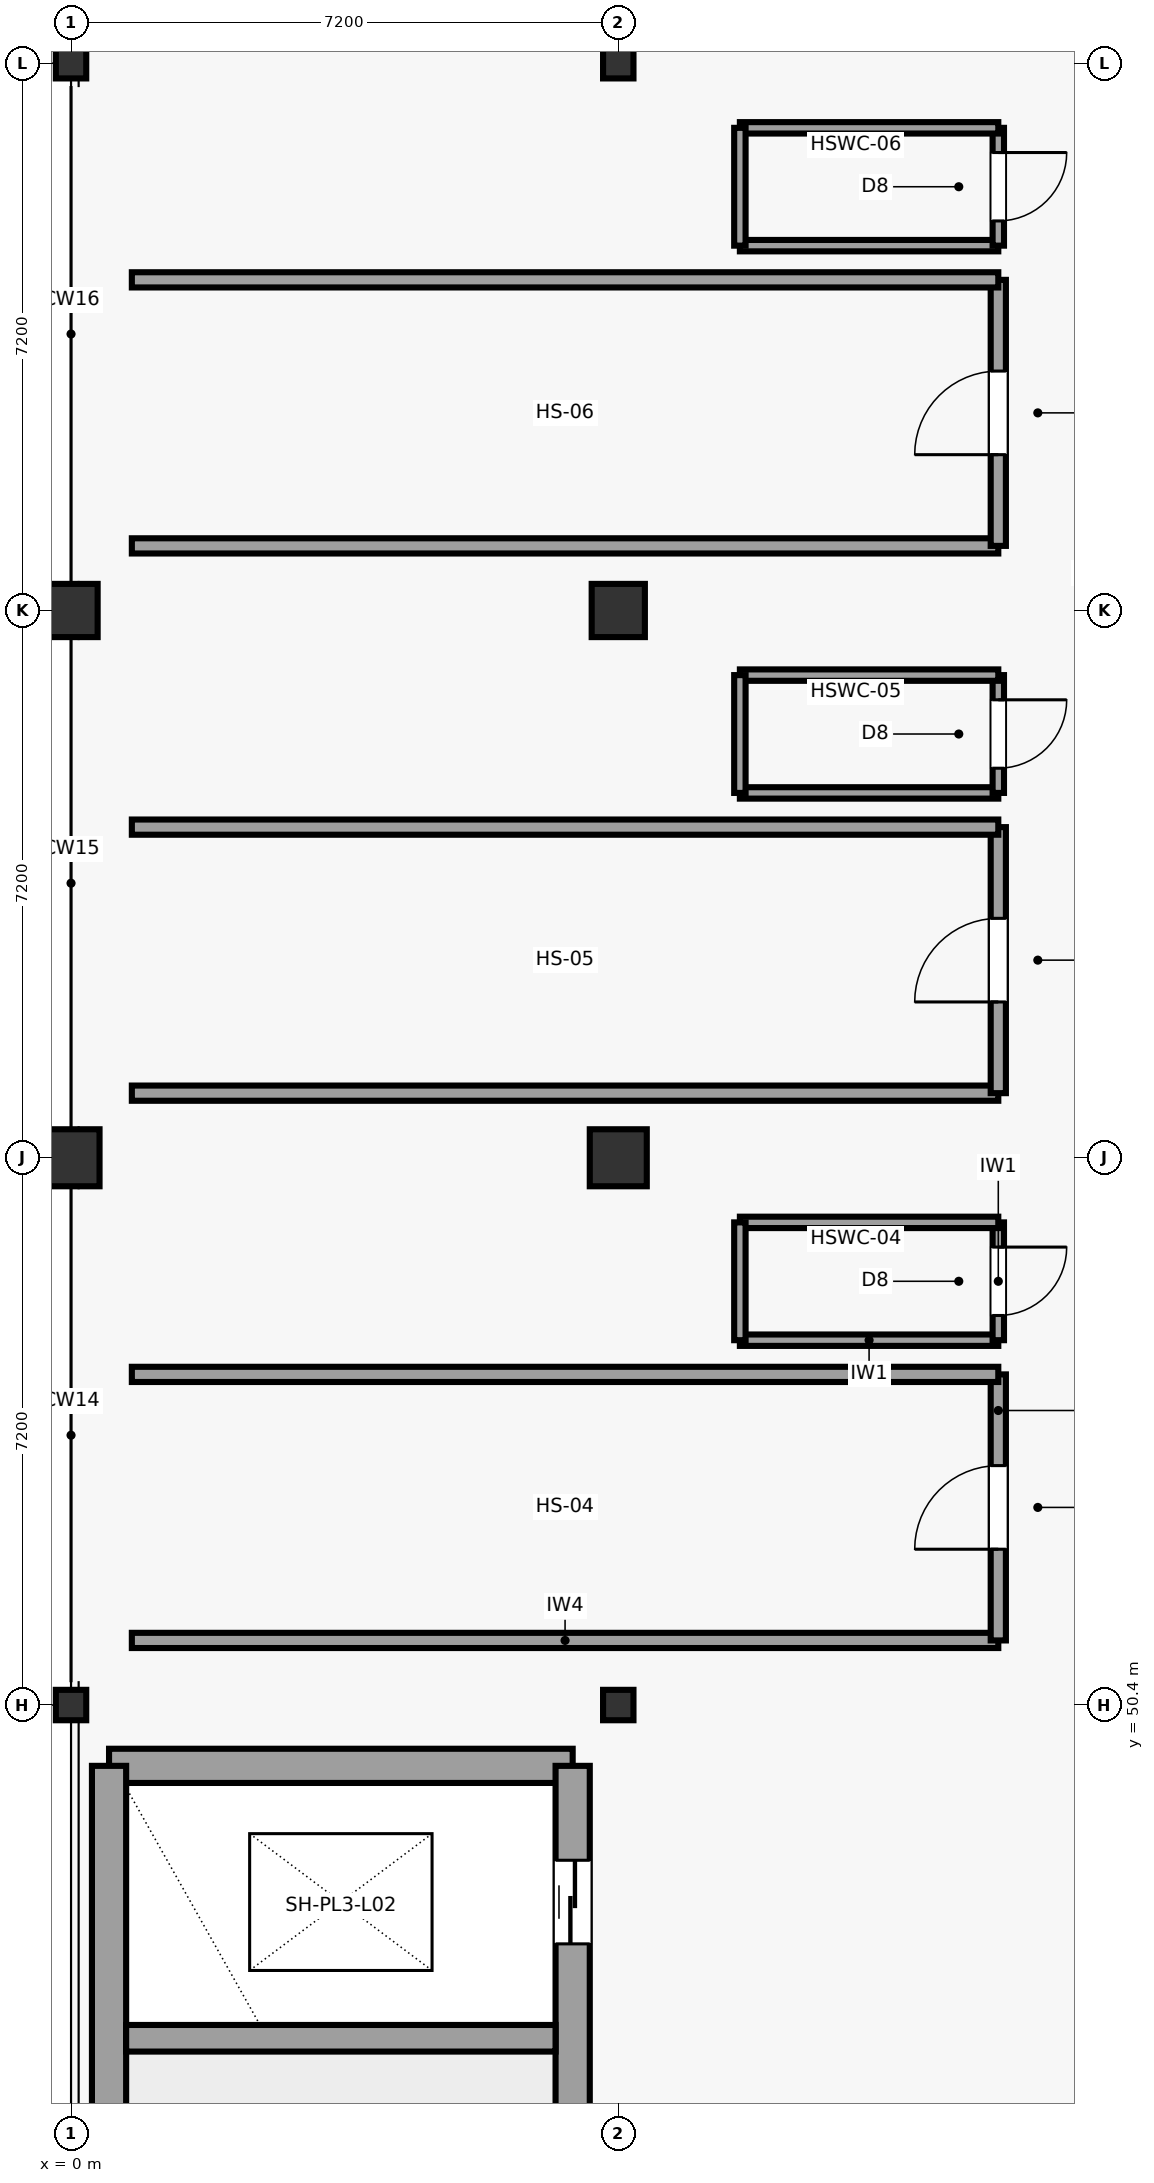
"""IFC4 building model, lengths in metres.
Left out: names, types, materials, properties, quantities, classifications, styles, units other than length and angle.
Written with IfcOpenShell. Run it as: python <this file> out.ifc"""

import sys

from ifc_helpers import new_model, si_unit, direction, frame, frame_2d, origin, origin_2d, place, context, subcontext, project, spatial, rectangle, hollow_rectangle, extrude, element, fill, save


model = new_model("IFC4")
c1 = context("Model", 3, precision=1e-05, world=origin(), true_north=direction((0.0, 1.0)))
c2 = subcontext(c1, "Body", "Model", "MODEL_VIEW")
j1 = project(units=[si_unit("LENGTHUNIT", "METRE"), si_unit("PLANEANGLEUNIT", "RADIAN")], contexts=[c1])
p1 = place(None, origin())
s1 = spatial("IfcSite", under=j1, at=p1, CompositionType="ELEMENT")
p2 = place(p1, origin())
s2 = spatial("IfcBuilding", under=s1, at=p2, CompositionType="ELEMENT")
p3 = place(p2, frame((0.0, 0.0, 9.6)))
s3 = spatial("IfcBuildingStorey", under=s2, at=p3, CompositionType="ELEMENT", Elevation=9.6)
p4 = place(p3, frame((0.0, 50.4, 0.0), z_axis=(0.0, 0.0, 1.0), x_axis=(1.0, 0.0, 0.0)))
e1 = element("IfcColumn", 1, at=p4, inside=s3, PredefinedType="COLUMN", context=c2, shape_type="SweptSolid", body=[
    extrude(hollow_rectangle(XDim=0.4, YDim=0.4, WallThickness=0.02, at=origin_2d()), origin(), (0.0, 0.0, 1.0), 4.2),
])
p5 = place(p3, frame((0.0, 57.6, 0.0), z_axis=(0.0, 0.0, 1.0), x_axis=(1.0, 0.0, 0.0)))
e2 = element("IfcColumn", 2, at=p5, inside=s3, PredefinedType="COLUMN", context=c2, shape_type="SweptSolid", body=[
    extrude(rectangle(XDim=0.75, YDim=0.75, at=origin_2d()), origin(), (0.0, 0.0, 1.0), 4.2),
])
p6 = place(p3, frame((0.0, 64.8, 0.0), z_axis=(0.0, 0.0, 1.0), x_axis=(1.0, 0.0, 0.0)))
e3 = element("IfcColumn", 3, at=p6, inside=s3, PredefinedType="COLUMN", context=c2, shape_type="SweptSolid", body=[
    extrude(rectangle(XDim=0.7, YDim=0.7, at=origin_2d()), origin(), (0.0, 0.0, 1.0), 4.2),
])
for number, where, z_axis, x_axis in (
    (4, (0.0, 72.0, 0.0), (0.0, 0.0, 1.0), (1.0, 0.0, 0.0)),
    (5, (7.2, 50.4, 0.0), (0.0, 0.0, 1.0), (1.0, 0.0, 0.0)),
):
    element("IfcColumn", number, at=place(p3, frame(where, z_axis=z_axis, x_axis=x_axis)), inside=s3, PredefinedType="COLUMN", context=c2, shape_type="SweptSolid", body=[
        extrude(hollow_rectangle(XDim=0.4, YDim=0.4, WallThickness=0.02, at=origin_2d()), origin(), (0.0, 0.0, 1.0), 4.2),
    ])
p7 = place(p3, frame((7.2, 57.6, 0.0), z_axis=(0.0, 0.0, 1.0), x_axis=(1.0, 0.0, 0.0)))
e6 = element("IfcColumn", 6, at=p7, inside=s3, PredefinedType="COLUMN", context=c2, shape_type="SweptSolid", body=[
    extrude(rectangle(XDim=0.75, YDim=0.75, at=origin_2d()), origin(), (0.0, 0.0, 1.0), 4.2),
])
p8 = place(p3, frame((7.2, 64.8, 0.0), z_axis=(0.0, 0.0, 1.0), x_axis=(1.0, 0.0, 0.0)))
e7 = element("IfcColumn", 7, at=p8, inside=s3, PredefinedType="COLUMN", context=c2, shape_type="SweptSolid", body=[
    extrude(rectangle(XDim=0.7, YDim=0.7, at=origin_2d()), origin(), (0.0, 0.0, 1.0), 4.2),
])
p9 = place(p3, frame((7.2, 72.0, 0.0), z_axis=(0.0, 0.0, 1.0), x_axis=(1.0, 0.0, 0.0)))
e8 = element("IfcColumn", 8, at=p9, inside=s3, PredefinedType="COLUMN", context=c2, shape_type="SweptSolid", body=[
    extrude(hollow_rectangle(XDim=0.4, YDim=0.4, WallThickness=0.02, at=origin_2d()), origin(), (0.0, 0.0, 1.0), 4.2),
])
p10 = place(p3, frame((0.5, 49.6, 0.0), z_axis=(0.0, 0.0, 1.0), x_axis=(1.0, 0.0, 0.0)))
e9 = element("IfcWall", 9, at=p10, inside=s3, PredefinedType="SHEAR", context=c2, shape_type="SweptSolid", body=[
    extrude(rectangle(XDim=6.1, YDim=0.45, at=frame_2d((3.05, 0.0))), origin(), (0.0, 0.0, 1.0), 3.88),
])
p11 = place(p3, frame((0.5, 36.8, 0.0), z_axis=(0.0, 0.0, 1.0), x_axis=(0.0, 1.0, 0.0)))
e10 = element("IfcWall", 10, at=p11, inside=s3, PredefinedType="SHEAR", context=c2, shape_type="SweptSolid", body=[
    extrude(rectangle(XDim=12.8, YDim=0.45, at=frame_2d((6.4, 0.0))), origin(), (0.0, 0.0, 1.0), 3.88),
])
p12 = place(p3, frame((6.6, 36.8, 0.0), z_axis=(0.0, 0.0, 1.0), x_axis=(0.0, 1.0, 0.0)))
e11 = element("IfcWall", 11, at=p12, inside=s3, PredefinedType="SHEAR", context=c2, shape_type="SweptSolid", body=[
    extrude(rectangle(XDim=12.8, YDim=0.45, at=frame_2d((6.4, 0.0))), origin(), (0.0, 0.0, 1.0), 3.88),
])
p13 = place(p12, frame((0.55, 0.0, 0.0)))
e12 = element("IfcOpeningElement", 12, at=p13, cuts=e11, PredefinedType="OPENING", context=c2, shape_type="SweptSolid", body=[
    extrude(rectangle(XDim=1.2, YDim=2.25, at=frame_2d((0.6, 1.125))), frame((0.0, 0.235, 0.0), z_axis=(0.0, -1.0, 0.0), x_axis=(1.0, 0.0, 0.0)), (0.0, 0.0, 1.0), 0.47),
])
p14 = place(p12, frame((10.458, 0.0, 0.0)))
e13 = element("IfcOpeningElement", 13, at=p14, cuts=e11, PredefinedType="OPENING", context=c2, shape_type="SweptSolid", body=[
    extrude(rectangle(XDim=1.1, YDim=2.2, at=frame_2d((0.55, 1.1))), frame((0.0, 0.235, 0.0), z_axis=(0.0, -1.0, 0.0), x_axis=(1.0, 0.0, 0.0)), (0.0, 0.0, 1.0), 0.47),
])
p15 = place(p3, frame((0.725, 46.016, 0.0), z_axis=(0.0, 0.0, 1.0), x_axis=(1.0, 0.0, 0.0)))
e14 = element("IfcWall", 14, at=p15, inside=s3, PredefinedType="SHEAR", context=c2, shape_type="SweptSolid", body=[
    extrude(rectangle(XDim=5.65, YDim=0.35, at=frame_2d((2.825, 0.0))), origin(), (0.0, 0.0, 1.0), 3.88),
])
p16 = place(p3, frame((0.8, 51.25, 0.0), z_axis=(0.0, 0.0, 1.0), x_axis=(1.0, 0.0, 0.0)))
e15 = element("IfcWall", 15, at=p16, inside=s3, PredefinedType="PARTITIONING", context=c2, shape_type="SweptSolid", body=[
    extrude(rectangle(XDim=11.4, YDim=0.2, at=frame_2d((5.7, 0.0))), origin(), (0.0, 0.0, 1.0), 2.94),
])
p17 = place(p3, frame((12.2, 51.25, 0.0), z_axis=(0.0, 0.0, 1.0), x_axis=(0.0, 1.0, 0.0)))
e16 = element("IfcWall", 16, at=p17, inside=s3, PredefinedType="PARTITIONING", context=c2, shape_type="SweptSolid", body=[
    extrude(rectangle(XDim=3.5, YDim=0.2, at=frame_2d((1.75, 0.0))), origin(), (0.0, 0.0, 1.0), 2.94),
])
p18 = place(p17, frame((1.2, 0.0, 0.0)))
e17 = element("IfcOpeningElement", 17, at=p18, cuts=e16, PredefinedType="OPENING", context=c2, shape_type="SweptSolid", body=[
    extrude(rectangle(XDim=1.1, YDim=2.25, at=frame_2d((0.55, 1.125))), frame((0.0, 0.11, 0.0), z_axis=(0.0, -1.0, 0.0), x_axis=(1.0, 0.0, 0.0)), (0.0, 0.0, 1.0), 0.22),
])
p19 = place(p3, frame((12.2, 54.75, 0.0), z_axis=(0.0, 0.0, 1.0), x_axis=(-1.0, 0.0, 0.0)))
e18 = element("IfcWall", 18, at=p19, inside=s3, PredefinedType="PARTITIONING", context=c2, shape_type="SweptSolid", body=[
    extrude(rectangle(XDim=11.4, YDim=0.2, at=frame_2d((5.7, 0.0))), origin(), (0.0, 0.0, 1.0), 2.94),
])
p20 = place(p3, frame((8.8, 55.2, 0.0), z_axis=(0.0, 0.0, 1.0), x_axis=(1.0, 0.0, 0.0)))
e19 = element("IfcWall", 19, at=p20, inside=s3, PredefinedType="PARTITIONING", context=c2, shape_type="SweptSolid", body=[
    extrude(rectangle(XDim=3.4, YDim=0.15, at=frame_2d((1.7, 0.0))), origin(), (0.0, 0.0, 1.0), 2.94),
])
p21 = place(p3, frame((12.2, 55.2, 0.0), z_axis=(0.0, 0.0, 1.0), x_axis=(0.0, 1.0, 0.0)))
e20 = element("IfcWall", 20, at=p21, inside=s3, PredefinedType="PARTITIONING", context=c2, shape_type="SweptSolid", body=[
    extrude(rectangle(XDim=1.55, YDim=0.15, at=frame_2d((0.775, 0.0))), origin(), (0.0, 0.0, 1.0), 2.94),
])
p22 = place(p21, frame((0.325, 0.0, 0.0)))
e21 = element("IfcOpeningElement", 21, at=p22, cuts=e20, PredefinedType="OPENING", context=c2, shape_type="SweptSolid", body=[
    extrude(rectangle(XDim=0.9, YDim=2.15, at=frame_2d((0.45, 1.075))), frame((0.0, 0.085, 0.0), z_axis=(0.0, -1.0, 0.0), x_axis=(1.0, 0.0, 0.0)), (0.0, 0.0, 1.0), 0.17),
])
p23 = place(p3, frame((12.2, 56.75, 0.0), z_axis=(0.0, 0.0, 1.0), x_axis=(-1.0, 0.0, 0.0)))
e22 = element("IfcWall", 22, at=p23, inside=s3, PredefinedType="PARTITIONING", context=c2, shape_type="SweptSolid", body=[
    extrude(rectangle(XDim=3.4, YDim=0.15, at=frame_2d((1.7, 0.0))), origin(), (0.0, 0.0, 1.0), 2.94),
])
p24 = place(p3, frame((8.8, 56.75, 0.0), z_axis=(0.0, 0.0, 1.0), x_axis=(0.0, -1.0, 0.0)))
e23 = element("IfcWall", 23, at=p24, inside=s3, PredefinedType="PARTITIONING", context=c2, shape_type="SweptSolid", body=[
    extrude(rectangle(XDim=1.55, YDim=0.15, at=frame_2d((0.775, 0.0))), origin(), (0.0, 0.0, 1.0), 2.94),
])
p25 = place(p3, frame((0.8, 58.45, 0.0), z_axis=(0.0, 0.0, 1.0), x_axis=(1.0, 0.0, 0.0)))
e24 = element("IfcWall", 24, at=p25, inside=s3, PredefinedType="PARTITIONING", context=c2, shape_type="SweptSolid", body=[
    extrude(rectangle(XDim=11.4, YDim=0.2, at=frame_2d((5.7, 0.0))), origin(), (0.0, 0.0, 1.0), 2.94),
])
p26 = place(p3, frame((12.2, 58.45, 0.0), z_axis=(0.0, 0.0, 1.0), x_axis=(0.0, 1.0, 0.0)))
e25 = element("IfcWall", 25, at=p26, inside=s3, PredefinedType="PARTITIONING", context=c2, shape_type="SweptSolid", body=[
    extrude(rectangle(XDim=3.5, YDim=0.2, at=frame_2d((1.75, 0.0))), origin(), (0.0, 0.0, 1.0), 2.94),
])
p27 = place(p26, frame((1.2, 0.0, 0.0)))
e26 = element("IfcOpeningElement", 26, at=p27, cuts=e25, PredefinedType="OPENING", context=c2, shape_type="SweptSolid", body=[
    extrude(rectangle(XDim=1.1, YDim=2.25, at=frame_2d((0.55, 1.125))), frame((0.0, 0.11, 0.0), z_axis=(0.0, -1.0, 0.0), x_axis=(1.0, 0.0, 0.0)), (0.0, 0.0, 1.0), 0.22),
])
p28 = place(p3, frame((12.2, 61.95, 0.0), z_axis=(0.0, 0.0, 1.0), x_axis=(-1.0, 0.0, 0.0)))
e27 = element("IfcWall", 27, at=p28, inside=s3, PredefinedType="PARTITIONING", context=c2, shape_type="SweptSolid", body=[
    extrude(rectangle(XDim=11.4, YDim=0.2, at=frame_2d((5.7, 0.0))), origin(), (0.0, 0.0, 1.0), 2.94),
])
p29 = place(p3, frame((8.8, 62.4, 0.0), z_axis=(0.0, 0.0, 1.0), x_axis=(1.0, 0.0, 0.0)))
e28 = element("IfcWall", 28, at=p29, inside=s3, PredefinedType="PARTITIONING", context=c2, shape_type="SweptSolid", body=[
    extrude(rectangle(XDim=3.4, YDim=0.15, at=frame_2d((1.7, 0.0))), origin(), (0.0, 0.0, 1.0), 2.94),
])
p30 = place(p3, frame((12.2, 62.4, 0.0), z_axis=(0.0, 0.0, 1.0), x_axis=(0.0, 1.0, 0.0)))
e29 = element("IfcWall", 29, at=p30, inside=s3, PredefinedType="PARTITIONING", context=c2, shape_type="SweptSolid", body=[
    extrude(rectangle(XDim=1.55, YDim=0.15, at=frame_2d((0.775, 0.0))), origin(), (0.0, 0.0, 1.0), 2.94),
])
p31 = place(p30, frame((0.325, 0.0, 0.0)))
e30 = element("IfcOpeningElement", 30, at=p31, cuts=e29, PredefinedType="OPENING", context=c2, shape_type="SweptSolid", body=[
    extrude(rectangle(XDim=0.9, YDim=2.15, at=frame_2d((0.45, 1.075))), frame((0.0, 0.085, 0.0), z_axis=(0.0, -1.0, 0.0), x_axis=(1.0, 0.0, 0.0)), (0.0, 0.0, 1.0), 0.17),
])
p32 = place(p3, frame((12.2, 63.95, 0.0), z_axis=(0.0, 0.0, 1.0), x_axis=(-1.0, 0.0, 0.0)))
e31 = element("IfcWall", 31, at=p32, inside=s3, PredefinedType="PARTITIONING", context=c2, shape_type="SweptSolid", body=[
    extrude(rectangle(XDim=3.4, YDim=0.15, at=frame_2d((1.7, 0.0))), origin(), (0.0, 0.0, 1.0), 2.94),
])
p33 = place(p3, frame((8.8, 63.95, 0.0), z_axis=(0.0, 0.0, 1.0), x_axis=(0.0, -1.0, 0.0)))
e32 = element("IfcWall", 32, at=p33, inside=s3, PredefinedType="PARTITIONING", context=c2, shape_type="SweptSolid", body=[
    extrude(rectangle(XDim=1.55, YDim=0.15, at=frame_2d((0.775, 0.0))), origin(), (0.0, 0.0, 1.0), 2.94),
])
p34 = place(p3, frame((0.8, 65.65, 0.0), z_axis=(0.0, 0.0, 1.0), x_axis=(1.0, 0.0, 0.0)))
e33 = element("IfcWall", 33, at=p34, inside=s3, PredefinedType="PARTITIONING", context=c2, shape_type="SweptSolid", body=[
    extrude(rectangle(XDim=11.4, YDim=0.2, at=frame_2d((5.7, 0.0))), origin(), (0.0, 0.0, 1.0), 2.94),
])
p35 = place(p3, frame((12.2, 65.65, 0.0), z_axis=(0.0, 0.0, 1.0), x_axis=(0.0, 1.0, 0.0)))
e34 = element("IfcWall", 34, at=p35, inside=s3, PredefinedType="PARTITIONING", context=c2, shape_type="SweptSolid", body=[
    extrude(rectangle(XDim=3.5, YDim=0.2, at=frame_2d((1.75, 0.0))), origin(), (0.0, 0.0, 1.0), 2.94),
])
p36 = place(p35, frame((1.2, 0.0, 0.0)))
e35 = element("IfcOpeningElement", 35, at=p36, cuts=e34, PredefinedType="OPENING", context=c2, shape_type="SweptSolid", body=[
    extrude(rectangle(XDim=1.1, YDim=2.25, at=frame_2d((0.55, 1.125))), frame((0.0, 0.11, 0.0), z_axis=(0.0, -1.0, 0.0), x_axis=(1.0, 0.0, 0.0)), (0.0, 0.0, 1.0), 0.22),
])
p37 = place(p3, frame((12.2, 69.15, 0.0), z_axis=(0.0, 0.0, 1.0), x_axis=(-1.0, 0.0, 0.0)))
e36 = element("IfcWall", 36, at=p37, inside=s3, PredefinedType="PARTITIONING", context=c2, shape_type="SweptSolid", body=[
    extrude(rectangle(XDim=11.4, YDim=0.2, at=frame_2d((5.7, 0.0))), origin(), (0.0, 0.0, 1.0), 2.94),
])
p38 = place(p3, frame((8.8, 69.6, 0.0), z_axis=(0.0, 0.0, 1.0), x_axis=(1.0, 0.0, 0.0)))
e37 = element("IfcWall", 37, at=p38, inside=s3, PredefinedType="PARTITIONING", context=c2, shape_type="SweptSolid", body=[
    extrude(rectangle(XDim=3.4, YDim=0.15, at=frame_2d((1.7, 0.0))), origin(), (0.0, 0.0, 1.0), 2.94),
])
p39 = place(p3, frame((12.2, 69.6, 0.0), z_axis=(0.0, 0.0, 1.0), x_axis=(0.0, 1.0, 0.0)))
e38 = element("IfcWall", 38, at=p39, inside=s3, PredefinedType="PARTITIONING", context=c2, shape_type="SweptSolid", body=[
    extrude(rectangle(XDim=1.55, YDim=0.15, at=frame_2d((0.775, 0.0))), origin(), (0.0, 0.0, 1.0), 2.94),
])
p40 = place(p39, frame((0.325, 0.0, 0.0)))
e39 = element("IfcOpeningElement", 39, at=p40, cuts=e38, PredefinedType="OPENING", context=c2, shape_type="SweptSolid", body=[
    extrude(rectangle(XDim=0.9, YDim=2.15, at=frame_2d((0.45, 1.075))), frame((0.0, 0.085, 0.0), z_axis=(0.0, -1.0, 0.0), x_axis=(1.0, 0.0, 0.0)), (0.0, 0.0, 1.0), 0.17),
])
p41 = place(p3, frame((12.2, 71.15, 0.0), z_axis=(0.0, 0.0, 1.0), x_axis=(-1.0, 0.0, 0.0)))
e40 = element("IfcWall", 40, at=p41, inside=s3, PredefinedType="PARTITIONING", context=c2, shape_type="SweptSolid", body=[
    extrude(rectangle(XDim=3.4, YDim=0.15, at=frame_2d((1.7, 0.0))), origin(), (0.0, 0.0, 1.0), 2.94),
])
p42 = place(p3, frame((8.8, 71.15, 0.0), z_axis=(0.0, 0.0, 1.0), x_axis=(0.0, -1.0, 0.0)))
e41 = element("IfcWall", 41, at=p42, inside=s3, PredefinedType="PARTITIONING", context=c2, shape_type="SweptSolid", body=[
    extrude(rectangle(XDim=1.55, YDim=0.15, at=frame_2d((0.775, 0.0))), origin(), (0.0, 0.0, 1.0), 2.94),
])
p43 = place(p14, origin())
e42 = element("IfcDoor", 42, at=p43, inside=s3, OperationType="SLIDING_TO_RIGHT", PredefinedType="DOOR", context=c2, shape_type="SweptSolid", body=[
    extrude(rectangle(XDim=1.1, YDim=2.2, at=frame_2d((0.55, 1.1))), frame((0.0, 0.025, 0.0), z_axis=(0.0, -1.0, 0.0), x_axis=(1.0, 0.0, 0.0)), (0.0, 0.0, 1.0), 0.05),
])
fill(e13, e42)
p44 = place(p18, origin())
e43 = element("IfcDoor", 43, at=p44, inside=s3, OperationType="SINGLE_SWING_LEFT", PredefinedType="DOOR", context=c2, shape_type="SweptSolid", body=[
    extrude(rectangle(XDim=1.1, YDim=2.25, at=frame_2d((0.55, 1.125))), frame((0.0, 0.025, 0.0), z_axis=(0.0, -1.0, 0.0), x_axis=(1.0, 0.0, 0.0)), (0.0, 0.0, 1.0), 0.05),
])
fill(e17, e43)
p45 = place(p22, frame((0.9, 0.0, 0.0), z_axis=(0.0, 0.0, 1.0), x_axis=(-1.0, 0.0, 0.0)))
e44 = element("IfcDoor", 44, at=p45, inside=s3, OperationType="SINGLE_SWING_RIGHT", PredefinedType="DOOR", context=c2, shape_type="SweptSolid", body=[
    extrude(rectangle(XDim=0.9, YDim=2.15, at=frame_2d((0.45, 1.075))), frame((0.0, 0.025, 0.0), z_axis=(0.0, -1.0, 0.0), x_axis=(1.0, 0.0, 0.0)), (0.0, 0.0, 1.0), 0.05),
])
fill(e21, e44)
p46 = place(p27, origin())
e45 = element("IfcDoor", 45, at=p46, inside=s3, OperationType="SINGLE_SWING_LEFT", PredefinedType="DOOR", context=c2, shape_type="SweptSolid", body=[
    extrude(rectangle(XDim=1.1, YDim=2.25, at=frame_2d((0.55, 1.125))), frame((0.0, 0.025, 0.0), z_axis=(0.0, -1.0, 0.0), x_axis=(1.0, 0.0, 0.0)), (0.0, 0.0, 1.0), 0.05),
])
fill(e26, e45)
p47 = place(p31, frame((0.9, 0.0, 0.0), z_axis=(0.0, 0.0, 1.0), x_axis=(-1.0, 0.0, 0.0)))
e46 = element("IfcDoor", 46, at=p47, inside=s3, OperationType="SINGLE_SWING_RIGHT", PredefinedType="DOOR", context=c2, shape_type="SweptSolid", body=[
    extrude(rectangle(XDim=0.9, YDim=2.15, at=frame_2d((0.45, 1.075))), frame((0.0, 0.025, 0.0), z_axis=(0.0, -1.0, 0.0), x_axis=(1.0, 0.0, 0.0)), (0.0, 0.0, 1.0), 0.05),
])
fill(e30, e46)
p48 = place(p36, origin())
e47 = element("IfcDoor", 47, at=p48, inside=s3, OperationType="SINGLE_SWING_LEFT", PredefinedType="DOOR", context=c2, shape_type="SweptSolid", body=[
    extrude(rectangle(XDim=1.1, YDim=2.25, at=frame_2d((0.55, 1.125))), frame((0.0, 0.025, 0.0), z_axis=(0.0, -1.0, 0.0), x_axis=(1.0, 0.0, 0.0)), (0.0, 0.0, 1.0), 0.05),
])
fill(e35, e47)
p49 = place(p40, frame((0.9, 0.0, 0.0), z_axis=(0.0, 0.0, 1.0), x_axis=(-1.0, 0.0, 0.0)))
e48 = element("IfcDoor", 48, at=p49, inside=s3, OperationType="SINGLE_SWING_RIGHT", PredefinedType="DOOR", context=c2, shape_type="SweptSolid", body=[
    extrude(rectangle(XDim=0.9, YDim=2.15, at=frame_2d((0.45, 1.075))), frame((0.0, 0.025, 0.0), z_axis=(0.0, -1.0, 0.0), x_axis=(1.0, 0.0, 0.0)), (0.0, 0.0, 1.0), 0.05),
])
fill(e39, e48)
save(model, sys.argv[1])
